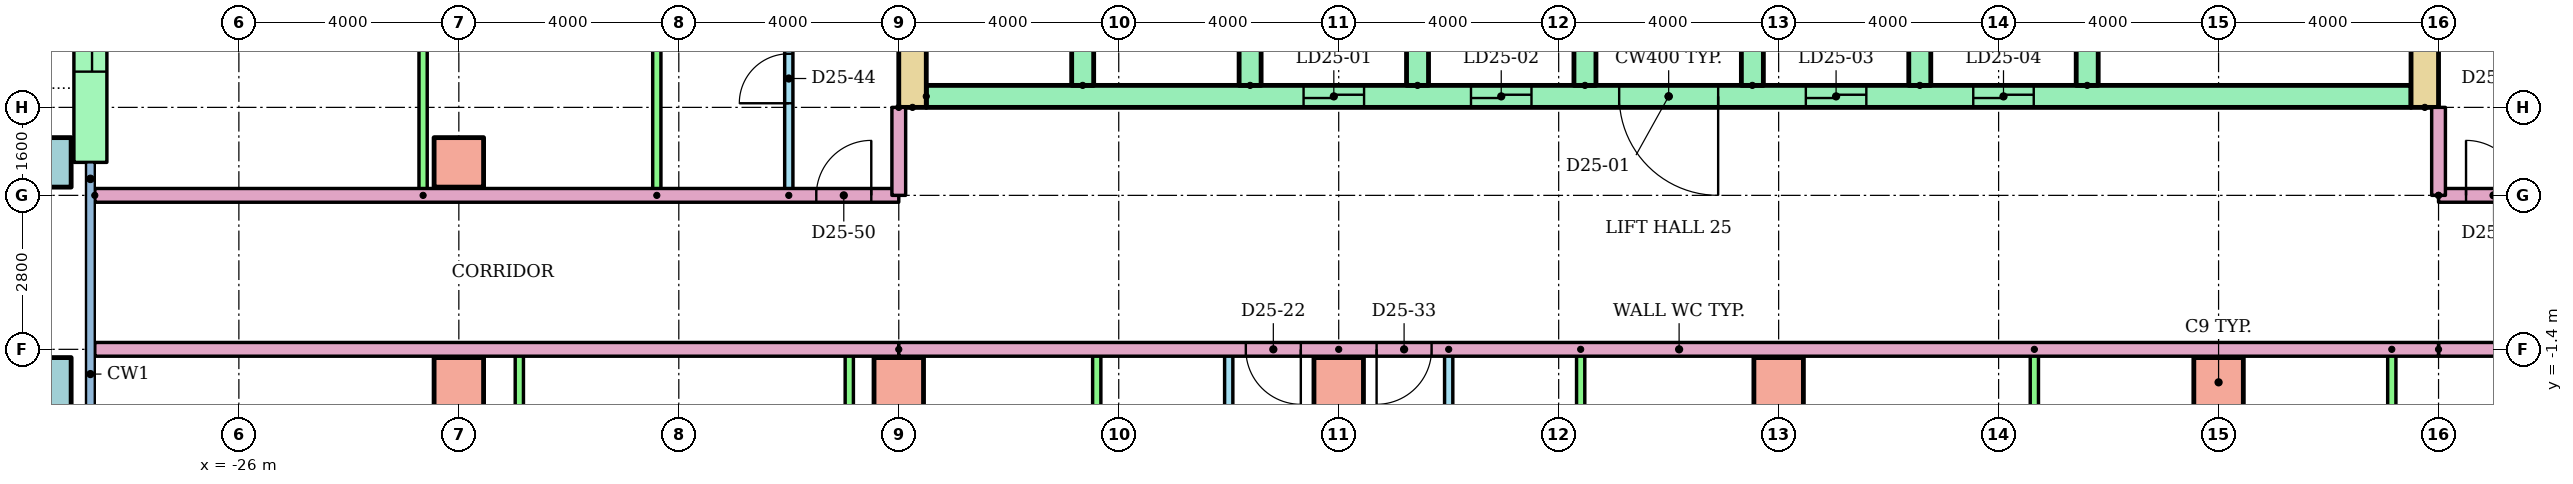
"""IFC4 building model, lengths in metres.
Left out: names, types, materials, properties, quantities, classifications, styles, units other than length and angle.
Written with IfcOpenShell. Run it as: python <this file> out.ifc"""

import sys

from ifc_helpers import new_model, si_unit, direction, frame, frame_2d, origin, origin_2d, place, context, subcontext, project, spatial, rectangle, hollow_rectangle, extrude, element, fill, save


model = new_model("IFC4")
c1 = context("Model", 3, precision=1e-05, world=origin(), true_north=direction((0.0, 1.0)))
c2 = subcontext(c1, "Body", "Model", "MODEL_VIEW")
j1 = project(units=[si_unit("LENGTHUNIT", "METRE"), si_unit("PLANEANGLEUNIT", "RADIAN")], contexts=[c1])
p1 = place(None, origin())
s1 = spatial("IfcSite", under=j1, at=p1, CompositionType="ELEMENT")
p2 = place(p1, origin())
s2 = spatial("IfcBuilding", under=s1, at=p2, CompositionType="ELEMENT")
p3 = place(p2, frame((0.0, 0.0, 96.7)))
s3 = spatial("IfcBuildingStorey", under=s2, at=p3, CompositionType="ELEMENT", Elevation=96.7)
p4 = place(p3, frame((-29.5, -2.0, 0.0)))
e1 = element("IfcColumn", 1, at=p4, inside=s3, PredefinedType="COLUMN", context=c2, shape_type="SweptSolid", body=[
    extrude(hollow_rectangle(XDim=0.9, YDim=0.9, WallThickness=0.045, at=origin_2d()), origin(), (0.0, 0.0, 1.0), 3.2),
])
for number, where in (
    (2, (-22.0, -2.0, 0.0)),
    (3, (-14.0, -2.0, 0.0)),
    (4, (-6.0, -2.0, 0.0)),
    (5, (2.0, -2.0, 0.0)),
    (6, (10.0, -2.0, 0.0)),
):
    element("IfcColumn", number, at=place(p3, frame(where)), inside=s3, PredefinedType="COLUMN", context=c2, shape_type="SweptSolid", body=[
        extrude(rectangle(XDim=0.9, YDim=0.9, at=origin_2d()), origin(), (0.0, 0.0, 1.0), 3.2),
    ])
p5 = place(p3, frame((-29.5, 2.0, 0.0)))
e7 = element("IfcColumn", 7, at=p5, inside=s3, PredefinedType="COLUMN", context=c2, shape_type="SweptSolid", body=[
    extrude(hollow_rectangle(XDim=0.9, YDim=0.9, WallThickness=0.045, at=origin_2d()), origin(), (0.0, 0.0, 1.0), 3.2),
])
p6 = place(p3, frame((-22.0, 2.0, 0.0)))
e8 = element("IfcColumn", 8, at=p6, inside=s3, PredefinedType="COLUMN", context=c2, shape_type="SweptSolid", body=[
    extrude(rectangle(XDim=0.9, YDim=0.9, at=origin_2d()), origin(), (0.0, 0.0, 1.0), 3.2),
])
p7 = place(p3, frame((-28.7, 6.5, 0.0), z_axis=(0.0, 0.0, 1.0), x_axis=(0.0, -1.0, 0.0)))
e9 = element("IfcWall", 9, at=p7, inside=s3, PredefinedType="STANDARD", context=c2, shape_type="SweptSolid", body=[
    extrude(rectangle(XDim=4.5, YDim=0.6, at=frame_2d((2.25, 0.0))), origin(), (0.0, 0.0, 1.0), 2.92),
])
p8 = place(p7, frame((1.65, 0.0, 0.0)))
e10 = element("IfcOpeningElement", 10, at=p8, cuts=e9, PredefinedType="OPENING", context=c2, shape_type="SweptSolid", body=[
    extrude(rectangle(XDim=1.2, YDim=2.1, at=frame_2d((0.6, 1.05))), frame((0.0, 0.31, 0.0), z_axis=(0.0, -1.0, 0.0), x_axis=(1.0, 0.0, 0.0)), (0.0, 0.0, 1.0), 0.62),
])
for number, where, z_axis, x_axis in (
    (11, (-13.75, 3.0, 0.0), (0.0, 0.0, 1.0), (0.0, 1.0, 0.0)),
    (12, (13.75, 3.0, 0.0), (0.0, 0.0, 1.0), (0.0, 1.0, 0.0)),
):
    element("IfcWall", number, at=place(p3, frame(where, z_axis=z_axis, x_axis=x_axis)), inside=s3, PredefinedType="SHEAR", context=c2, shape_type="SweptSolid", body=[
        extrude(rectangle(XDim=17.0, YDim=0.5, at=frame_2d((8.5, 0.0))), origin(), (0.0, 0.0, 1.0), 2.92),
    ])
p9 = place(p3, frame((-13.5, 3.2, 0.0)))
e13 = element("IfcWall", 13, at=p9, inside=s3, PredefinedType="SHEAR", context=c2, shape_type="SweptSolid", body=[
    extrude(rectangle(XDim=27.0, YDim=0.4, at=frame_2d((13.5, 0.0))), origin(), (0.0, 0.0, 1.0), 2.92),
])
p10 = place(p9, frame((6.861, 0.0, 0.0)))
e14 = element("IfcOpeningElement", 14, at=p10, cuts=e13, PredefinedType="OPENING", context=c2, shape_type="SweptSolid", body=[
    extrude(rectangle(XDim=1.1, YDim=2.1, at=frame_2d((0.55, 1.05))), frame((0.0, 0.21, 0.0), z_axis=(0.0, -1.0, 0.0), x_axis=(1.0, 0.0, 0.0)), (0.0, 0.0, 1.0), 0.42),
])
p11 = place(p9, frame((9.906, 0.0, 0.0)))
e15 = element("IfcOpeningElement", 15, at=p11, cuts=e13, PredefinedType="OPENING", context=c2, shape_type="SweptSolid", body=[
    extrude(rectangle(XDim=1.1, YDim=2.1, at=frame_2d((0.55, 1.05))), frame((0.0, 0.21, 0.0), z_axis=(0.0, -1.0, 0.0), x_axis=(1.0, 0.0, 0.0)), (0.0, 0.0, 1.0), 0.42),
])
p12 = place(p9, frame((15.994, 0.0, 0.0)))
e16 = element("IfcOpeningElement", 16, at=p12, cuts=e13, PredefinedType="OPENING", context=c2, shape_type="SweptSolid", body=[
    extrude(rectangle(XDim=1.1, YDim=2.1, at=frame_2d((0.55, 1.05))), frame((0.0, 0.21, 0.0), z_axis=(0.0, -1.0, 0.0), x_axis=(1.0, 0.0, 0.0)), (0.0, 0.0, 1.0), 0.42),
])
p13 = place(p9, frame((19.039, 0.0, 0.0)))
e17 = element("IfcOpeningElement", 17, at=p13, cuts=e13, PredefinedType="OPENING", context=c2, shape_type="SweptSolid", body=[
    extrude(rectangle(XDim=1.1, YDim=2.1, at=frame_2d((0.55, 1.05))), frame((0.0, 0.21, 0.0), z_axis=(0.0, -1.0, 0.0), x_axis=(1.0, 0.0, 0.0)), (0.0, 0.0, 1.0), 0.42),
])
p14 = place(p9, frame((12.6, 0.0, 0.0)))
e18 = element("IfcOpeningElement", 18, at=p14, cuts=e13, PredefinedType="OPENING", context=c2, shape_type="SweptSolid", body=[
    extrude(rectangle(XDim=1.8, YDim=2.1, at=frame_2d((0.9, 1.05))), frame((0.0, 0.21, 0.0), z_axis=(0.0, -1.0, 0.0), x_axis=(1.0, 0.0, 0.0)), (0.0, 0.0, 1.0), 0.42),
])
for number, where, z_axis, x_axis in (
    (19, (-10.656, 3.4, 0.0), (0.0, 0.0, 1.0), (0.0, 1.0, 0.0)),
    (20, (-7.611, 3.4, 0.0), (0.0, 0.0, 1.0), (0.0, 1.0, 0.0)),
    (21, (-4.567, 3.4, 0.0), (0.0, 0.0, 1.0), (0.0, 1.0, 0.0)),
    (22, (-1.522, 3.4, 0.0), (0.0, 0.0, 1.0), (0.0, 1.0, 0.0)),
    (23, (1.522, 3.4, 0.0), (0.0, 0.0, 1.0), (0.0, 1.0, 0.0)),
    (24, (4.567, 3.4, 0.0), (0.0, 0.0, 1.0), (0.0, 1.0, 0.0)),
    (25, (7.611, 3.4, 0.0), (0.0, 0.0, 1.0), (0.0, 1.0, 0.0)),
):
    element("IfcWall", number, at=place(p3, frame(where, z_axis=z_axis, x_axis=x_axis)), inside=s3, PredefinedType="SHEAR", context=c2, shape_type="SweptSolid", body=[
        extrude(rectangle(XDim=3.0, YDim=0.4, at=frame_2d((1.5, 0.0))), origin(), (0.0, 0.0, 1.0), 2.92),
    ])
p15 = place(p3, frame((-8.0, -6.7, 0.0), z_axis=(0.0, 0.0, 1.0), x_axis=(0.0, 1.0, 0.0)))
e26 = element("IfcWall", 26, at=p15, inside=s3, PredefinedType="PARTITIONING", context=c2, shape_type="SweptSolid", body=[
    extrude(rectangle(XDim=5.3, YDim=0.15, at=frame_2d((2.65, 0.0))), origin(), (0.0, 0.0, 1.0), 2.4),
])
p16 = place(p15, frame((3.35, 0.0, 0.0)))
e27 = element("IfcOpeningElement", 27, at=p16, cuts=e26, PredefinedType="OPENING", context=c2, shape_type="SweptSolid", body=[
    extrude(rectangle(XDim=0.9, YDim=2.1, at=frame_2d((0.45, 1.05))), frame((0.0, 0.085, 0.0), z_axis=(0.0, -1.0, 0.0), x_axis=(1.0, 0.0, 0.0)), (0.0, 0.0, 1.0), 0.17),
])
p17 = place(p15, frame((0.75, 0.0, 0.0)))
e28 = element("IfcOpeningElement", 28, at=p17, cuts=e26, PredefinedType="OPENING", context=c2, shape_type="SweptSolid", body=[
    extrude(rectangle(XDim=0.8, YDim=2.1, at=frame_2d((0.4, 1.05))), frame((0.0, 0.085, 0.0), z_axis=(0.0, -1.0, 0.0), x_axis=(1.0, 0.0, 0.0)), (0.0, 0.0, 1.0), 0.17),
])
for number, where, z_axis, x_axis in (
    (29, (-10.4, -6.7, 0.0), (0.0, 0.0, 1.0), (0.0, 1.0, 0.0)),
    (30, (-14.9, -6.7, 0.0), (0.0, 0.0, 1.0), (0.0, 1.0, 0.0)),
    (31, (-20.9, -6.7, 0.0), (0.0, 0.0, 1.0), (0.0, 1.0, 0.0)),
):
    element("IfcWall", number, at=place(p3, frame(where, z_axis=z_axis, x_axis=x_axis)), inside=s3, PredefinedType="PARTITIONING", context=c2, shape_type="SweptSolid", body=[
        extrude(rectangle(XDim=5.3, YDim=0.15, at=frame_2d((2.65, 0.0))), origin(), (0.0, 0.0, 1.0), 2.4),
    ])
p18 = place(p3, frame((-4.0, -1.4, 0.0), z_axis=(0.0, 0.0, 1.0), x_axis=(0.0, -1.0, 0.0)))
e32 = element("IfcWall", 32, at=p18, inside=s3, PredefinedType="PARTITIONING", context=c2, shape_type="SweptSolid", body=[
    extrude(rectangle(XDim=5.3, YDim=0.15, at=frame_2d((2.65, 0.0))), origin(), (0.0, 0.0, 1.0), 2.4),
])
p19 = place(p18, frame((1.05, 0.0, 0.0)))
e33 = element("IfcOpeningElement", 33, at=p19, cuts=e32, PredefinedType="OPENING", context=c2, shape_type="SweptSolid", body=[
    extrude(rectangle(XDim=0.9, YDim=2.1, at=frame_2d((0.45, 1.05))), frame((0.0, 0.085, 0.0), z_axis=(0.0, -1.0, 0.0), x_axis=(1.0, 0.0, 0.0)), (0.0, 0.0, 1.0), 0.17),
])
p20 = place(p18, frame((3.75, 0.0, 0.0)))
e34 = element("IfcOpeningElement", 34, at=p20, cuts=e32, PredefinedType="OPENING", context=c2, shape_type="SweptSolid", body=[
    extrude(rectangle(XDim=0.8, YDim=2.1, at=frame_2d((0.4, 1.05))), frame((0.0, 0.085, 0.0), z_axis=(0.0, -1.0, 0.0), x_axis=(1.0, 0.0, 0.0)), (0.0, 0.0, 1.0), 0.17),
])
for number, where, z_axis, x_axis in (
    (35, (-1.6, -1.4, 0.0), (0.0, 0.0, 1.0), (0.0, -1.0, 0.0)),
    (36, (6.65, -1.4, 0.0), (0.0, 0.0, 1.0), (0.0, -1.0, 0.0)),
    (37, (13.15, -1.4, 0.0), (0.0, 0.0, 1.0), (0.0, -1.0, 0.0)),
):
    element("IfcWall", number, at=place(p3, frame(where, z_axis=z_axis, x_axis=x_axis)), inside=s3, PredefinedType="PARTITIONING", context=c2, shape_type="SweptSolid", body=[
        extrude(rectangle(XDim=5.3, YDim=0.15, at=frame_2d((2.65, 0.0))), origin(), (0.0, 0.0, 1.0), 2.4),
    ])
p21 = place(p3, frame((-6.0, -1.4, 0.0), z_axis=(0.0, 0.0, 1.0), x_axis=(0.0, -1.0, 0.0)))
e38 = element("IfcWall", 38, at=p21, inside=s3, PredefinedType="PARTITIONING", context=c2, shape_type="SweptSolid", body=[
    extrude(rectangle(XDim=14.81, YDim=0.25, at=frame_2d((7.405, 0.0))), origin(), (0.0, 0.0, 1.0), 2.4),
])
p22 = place(p3, frame((-14.0, -1.4, 0.0), z_axis=(0.0, 0.0, 1.0), x_axis=(-1.0, 0.0, 0.0)))
e39 = element("IfcWall", 39, at=p22, inside=s3, PredefinedType="PARTITIONING", context=c2, shape_type="SweptSolid", body=[
    extrude(rectangle(XDim=14.62, YDim=0.25, at=frame_2d((7.31, 0.0))), origin(), (0.0, 0.0, 1.0), 2.4),
])
p23 = place(p3, frame((29.0, -1.4, 0.0), z_axis=(0.0, 0.0, 1.0), x_axis=(-1.0, 0.0, 0.0)))
e40 = element("IfcWall", 40, at=p23, inside=s3, PredefinedType="PARTITIONING", context=c2, shape_type="SweptSolid", body=[
    extrude(rectangle(XDim=15.0, YDim=0.25, at=frame_2d((7.5, 0.0))), origin(), (0.0, 0.0, 1.0), 2.4),
])
p24 = place(p23, frame((9.311, 0.0, 0.0)))
e41 = element("IfcOpeningElement", 41, at=p24, cuts=e40, PredefinedType="OPENING", context=c2, shape_type="SweptSolid", body=[
    extrude(rectangle(XDim=1.0, YDim=2.1, at=frame_2d((0.5, 1.05))), frame((0.0, 0.135, 0.0), z_axis=(0.0, -1.0, 0.0), x_axis=(1.0, 0.0, 0.0)), (0.0, 0.0, 1.0), 0.27),
])
p25 = place(p3, frame((-16.0, 1.4, 0.0), z_axis=(0.0, 0.0, 1.0), x_axis=(0.0, 1.0, 0.0)))
e42 = element("IfcWall", 42, at=p25, inside=s3, PredefinedType="PARTITIONING", context=c2, shape_type="SweptSolid", body=[
    extrude(rectangle(XDim=7.7, YDim=0.15, at=frame_2d((3.85, 0.0))), origin(), (0.0, 0.0, 1.0), 2.4),
])
p26 = place(p25, frame((1.675, 0.0, 0.0)))
e43 = element("IfcOpeningElement", 43, at=p26, cuts=e42, PredefinedType="OPENING", context=c2, shape_type="SweptSolid", body=[
    extrude(rectangle(XDim=0.9, YDim=2.1, at=frame_2d((0.45, 1.05))), frame((0.0, 0.085, 0.0), z_axis=(0.0, -1.0, 0.0), x_axis=(1.0, 0.0, 0.0)), (0.0, 0.0, 1.0), 0.17),
])
p27 = place(p25, frame((5.575, 0.0, 0.0)))
e44 = element("IfcOpeningElement", 44, at=p27, cuts=e42, PredefinedType="OPENING", context=c2, shape_type="SweptSolid", body=[
    extrude(rectangle(XDim=0.8, YDim=2.1, at=frame_2d((0.4, 1.05))), frame((0.0, 0.085, 0.0), z_axis=(0.0, -1.0, 0.0), x_axis=(1.0, 0.0, 0.0)), (0.0, 0.0, 1.0), 0.17),
])
for number, where, z_axis, x_axis in (
    (45, (-18.4, 1.4, 0.0), (0.0, 0.0, 1.0), (0.0, 1.0, 0.0)),
    (46, (-22.65, 1.4, 0.0), (0.0, 0.0, 1.0), (0.0, 1.0, 0.0)),
):
    element("IfcWall", number, at=place(p3, frame(where, z_axis=z_axis, x_axis=x_axis)), inside=s3, PredefinedType="PARTITIONING", context=c2, shape_type="SweptSolid", body=[
        extrude(rectangle(XDim=7.7, YDim=0.15, at=frame_2d((3.85, 0.0))), origin(), (0.0, 0.0, 1.0), 2.4),
    ])
p28 = place(p3, frame((-28.62, 1.4, 0.0)))
e47 = element("IfcWall", 47, at=p28, inside=s3, PredefinedType="PARTITIONING", context=c2, shape_type="SweptSolid", body=[
    extrude(rectangle(XDim=14.62, YDim=0.25, at=frame_2d((7.31, 0.0))), origin(), (0.0, 0.0, 1.0), 2.4),
])
p29 = place(p28, frame((13.12, 0.0, 0.0)))
e48 = element("IfcOpeningElement", 48, at=p29, cuts=e47, PredefinedType="OPENING", context=c2, shape_type="SweptSolid", body=[
    extrude(rectangle(XDim=1.0, YDim=2.1, at=frame_2d((0.5, 1.05))), frame((0.0, 0.135, 0.0), z_axis=(0.0, -1.0, 0.0), x_axis=(1.0, 0.0, 0.0)), (0.0, 0.0, 1.0), 0.27),
])
p30 = place(p3, frame((14.0, 1.4, 0.0)))
e49 = element("IfcWall", 49, at=p30, inside=s3, PredefinedType="PARTITIONING", context=c2, shape_type="SweptSolid", body=[
    extrude(rectangle(XDim=15.0, YDim=0.25, at=frame_2d((7.5, 0.0))), origin(), (0.0, 0.0, 1.0), 2.4),
])
p31 = place(p30, frame((0.5, 0.0, 0.0)))
e50 = element("IfcOpeningElement", 50, at=p31, cuts=e49, PredefinedType="OPENING", context=c2, shape_type="SweptSolid", body=[
    extrude(rectangle(XDim=1.0, YDim=2.1, at=frame_2d((0.5, 1.05))), frame((0.0, 0.135, 0.0), z_axis=(0.0, -1.0, 0.0), x_axis=(1.0, 0.0, 0.0)), (0.0, 0.0, 1.0), 0.27),
])
p32 = place(p30, frame((12.689, 0.0, 0.0)))
e51 = element("IfcOpeningElement", 51, at=p32, cuts=e49, PredefinedType="OPENING", context=c2, shape_type="SweptSolid", body=[
    extrude(rectangle(XDim=1.0, YDim=2.1, at=frame_2d((0.5, 1.05))), frame((0.0, 0.135, 0.0), z_axis=(0.0, -1.0, 0.0), x_axis=(1.0, 0.0, 0.0)), (0.0, 0.0, 1.0), 0.27),
])
p33 = place(p3, frame((14.0, -1.4, 0.0), z_axis=(0.0, 0.0, 1.0), x_axis=(-1.0, 0.0, 0.0)))
e52 = element("IfcWall", 52, at=p33, inside=s3, PredefinedType="PARTITIONING", context=c2, shape_type="SweptSolid", body=[
    extrude(rectangle(XDim=28.0, YDim=0.25, at=frame_2d((14.0, 0.0))), origin(), (0.0, 0.0, 1.0), 2.4),
])
p34 = place(p33, frame((20.689, 0.0, 0.0)))
e53 = element("IfcOpeningElement", 53, at=p34, cuts=e52, PredefinedType="OPENING", context=c2, shape_type="SweptSolid", body=[
    extrude(rectangle(XDim=1.0, YDim=2.1, at=frame_2d((0.5, 1.05))), frame((0.0, 0.135, 0.0), z_axis=(0.0, -1.0, 0.0), x_axis=(1.0, 0.0, 0.0)), (0.0, 0.0, 1.0), 0.27),
])
p35 = place(p33, frame((18.311, 0.0, 0.0)))
e54 = element("IfcOpeningElement", 54, at=p35, cuts=e52, PredefinedType="OPENING", context=c2, shape_type="SweptSolid", body=[
    extrude(rectangle(XDim=1.0, YDim=2.1, at=frame_2d((0.5, 1.05))), frame((0.0, 0.135, 0.0), z_axis=(0.0, -1.0, 0.0), x_axis=(1.0, 0.0, 0.0)), (0.0, 0.0, 1.0), 0.27),
])
for number, where, z_axis, x_axis in (
    (55, (-14.0, 3.0, 0.0), (0.0, 0.0, 1.0), (0.0, -1.0, 0.0)),
    (56, (14.0, 1.4, 0.0), (0.0, 0.0, 1.0), (0.0, 1.0, 0.0)),
):
    element("IfcWall", number, at=place(p3, frame(where, z_axis=z_axis, x_axis=x_axis)), inside=s3, PredefinedType="PARTITIONING", context=c2, shape_type="SweptSolid", body=[
        extrude(rectangle(XDim=1.6, YDim=0.25, at=frame_2d((0.8, 0.0))), origin(), (0.0, 0.0, 1.0), 2.4),
    ])
p36 = place(p10, origin())
e57 = element("IfcDoor", 57, at=p36, inside=s3, OperationType="SLIDING_TO_LEFT", PredefinedType="DOOR", context=c2, shape_type="SweptSolid", body=[
    extrude(rectangle(XDim=1.1, YDim=2.1, at=frame_2d((0.55, 1.05))), frame((0.0, 0.025, 0.0), z_axis=(0.0, -1.0, 0.0), x_axis=(1.0, 0.0, 0.0)), (0.0, 0.0, 1.0), 0.05),
])
fill(e14, e57)
p37 = place(p11, origin())
e58 = element("IfcDoor", 58, at=p37, inside=s3, OperationType="SLIDING_TO_LEFT", PredefinedType="DOOR", context=c2, shape_type="SweptSolid", body=[
    extrude(rectangle(XDim=1.1, YDim=2.1, at=frame_2d((0.55, 1.05))), frame((0.0, 0.025, 0.0), z_axis=(0.0, -1.0, 0.0), x_axis=(1.0, 0.0, 0.0)), (0.0, 0.0, 1.0), 0.05),
])
fill(e15, e58)
p38 = place(p12, origin())
e59 = element("IfcDoor", 59, at=p38, inside=s3, OperationType="SLIDING_TO_LEFT", PredefinedType="DOOR", context=c2, shape_type="SweptSolid", body=[
    extrude(rectangle(XDim=1.1, YDim=2.1, at=frame_2d((0.55, 1.05))), frame((0.0, 0.025, 0.0), z_axis=(0.0, -1.0, 0.0), x_axis=(1.0, 0.0, 0.0)), (0.0, 0.0, 1.0), 0.05),
])
fill(e16, e59)
p39 = place(p13, origin())
e60 = element("IfcDoor", 60, at=p39, inside=s3, OperationType="SLIDING_TO_LEFT", PredefinedType="DOOR", context=c2, shape_type="SweptSolid", body=[
    extrude(rectangle(XDim=1.1, YDim=2.1, at=frame_2d((0.55, 1.05))), frame((0.0, 0.025, 0.0), z_axis=(0.0, -1.0, 0.0), x_axis=(1.0, 0.0, 0.0)), (0.0, 0.0, 1.0), 0.05),
])
fill(e17, e60)
p40 = place(p14, frame((1.8, 0.0, 0.0), z_axis=(0.0, 0.0, 1.0), x_axis=(-1.0, 0.0, 0.0)))
e61 = element("IfcDoor", 61, at=p40, inside=s3, OperationType="DOUBLE_DOOR_SINGLE_SWING", PredefinedType="DOOR", context=c2, shape_type="SweptSolid", body=[
    extrude(rectangle(XDim=1.8, YDim=2.1, at=frame_2d((0.9, 1.05))), frame((0.0, 0.025, 0.0), z_axis=(0.0, -1.0, 0.0), x_axis=(1.0, 0.0, 0.0)), (0.0, 0.0, 1.0), 0.05),
])
fill(e18, e61)
p41 = place(p34, origin())
e62 = element("IfcDoor", 62, at=p41, inside=s3, OperationType="SINGLE_SWING_LEFT", PredefinedType="DOOR", context=c2, shape_type="SweptSolid", body=[
    extrude(rectangle(XDim=1.0, YDim=2.1, at=frame_2d((0.5, 1.05))), frame((0.0, 0.025, 0.0), z_axis=(0.0, -1.0, 0.0), x_axis=(1.0, 0.0, 0.0)), (0.0, 0.0, 1.0), 0.05),
])
fill(e53, e62)
p42 = place(p35, origin())
e63 = element("IfcDoor", 63, at=p42, inside=s3, OperationType="SINGLE_SWING_RIGHT", PredefinedType="DOOR", context=c2, shape_type="SweptSolid", body=[
    extrude(rectangle(XDim=1.0, YDim=2.1, at=frame_2d((0.5, 1.05))), frame((0.0, 0.025, 0.0), z_axis=(0.0, -1.0, 0.0), x_axis=(1.0, 0.0, 0.0)), (0.0, 0.0, 1.0), 0.05),
])
fill(e54, e63)
p43 = place(p26, origin())
e64 = element("IfcDoor", 64, at=p43, inside=s3, OperationType="SINGLE_SWING_LEFT", PredefinedType="DOOR", context=c2, shape_type="SweptSolid", body=[
    extrude(rectangle(XDim=0.9, YDim=2.1, at=frame_2d((0.45, 1.05))), frame((0.0, 0.025, 0.0), z_axis=(0.0, -1.0, 0.0), x_axis=(1.0, 0.0, 0.0)), (0.0, 0.0, 1.0), 0.05),
])
fill(e43, e64)
p44 = place(p29, origin())
e65 = element("IfcDoor", 65, at=p44, inside=s3, OperationType="SINGLE_SWING_RIGHT", PredefinedType="DOOR", context=c2, shape_type="SweptSolid", body=[
    extrude(rectangle(XDim=1.0, YDim=2.1, at=frame_2d((0.5, 1.05))), frame((0.0, 0.025, 0.0), z_axis=(0.0, -1.0, 0.0), x_axis=(1.0, 0.0, 0.0)), (0.0, 0.0, 1.0), 0.05),
])
fill(e48, e65)
p45 = place(p31, origin())
e66 = element("IfcDoor", 66, at=p45, inside=s3, OperationType="SINGLE_SWING_LEFT", PredefinedType="DOOR", context=c2, shape_type="SweptSolid", body=[
    extrude(rectangle(XDim=1.0, YDim=2.1, at=frame_2d((0.5, 1.05))), frame((0.0, 0.025, 0.0), z_axis=(0.0, -1.0, 0.0), x_axis=(1.0, 0.0, 0.0)), (0.0, 0.0, 1.0), 0.05),
])
fill(e50, e66)
p46 = place(p8, origin())
e67 = element("IfcDoor", 67, at=p46, inside=s3, OperationType="SLIDING_TO_LEFT", PredefinedType="DOOR", context=c2, shape_type="SweptSolid", body=[
    extrude(rectangle(XDim=1.2, YDim=2.1, at=frame_2d((0.6, 1.05))), frame((0.0, 0.025, 0.0), z_axis=(0.0, -1.0, 0.0), x_axis=(1.0, 0.0, 0.0)), (0.0, 0.0, 1.0), 0.05),
])
fill(e10, e67)
save(model, sys.argv[1])
